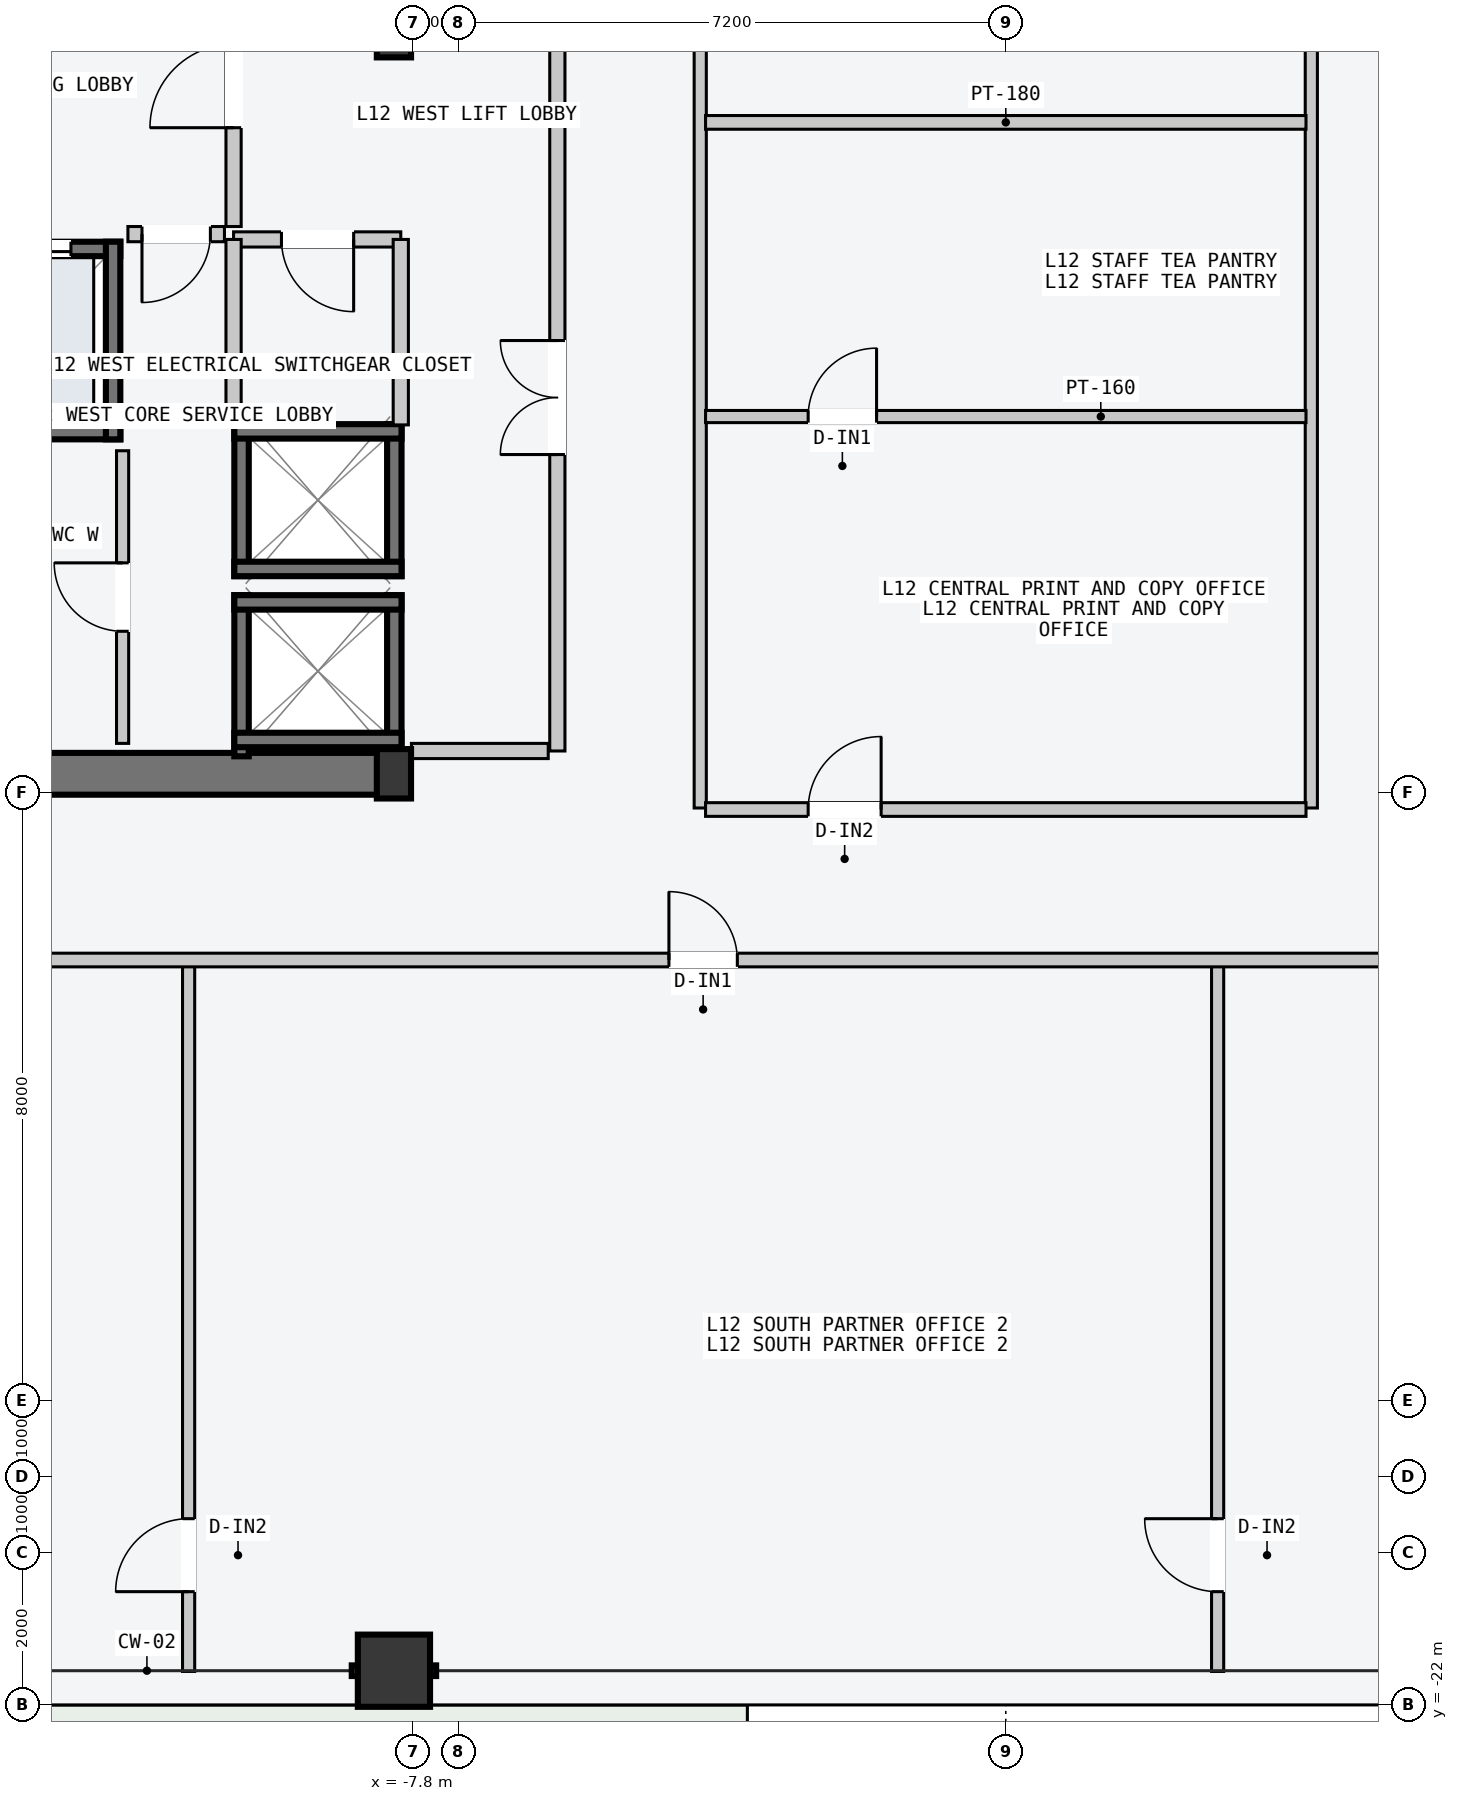
"""IFC4 building model, lengths in metres.
Left out: names, types, materials, properties, quantities, classifications, styles, units other than length and angle.
Written with IfcOpenShell. Run it as: python <this file> out.ifc"""

import sys

from ifc_helpers import new_model, si_unit, direction, frame, frame_2d, origin, origin_2d, place, context, subcontext, project, spatial, rectangle, hollow_rectangle, i_section, extrude, element, fill, save


model = new_model("IFC4")
c1 = context("Model", 3, precision=1e-05, world=origin(), true_north=direction((0.0, 1.0)))
c2 = subcontext(c1, "Body", "Model", "MODEL_VIEW")
j1 = project(units=[si_unit("LENGTHUNIT", "METRE"), si_unit("PLANEANGLEUNIT", "RADIAN")], contexts=[c1])
p1 = place(None, origin())
s1 = spatial("IfcSite", under=j1, at=p1, CompositionType="ELEMENT")
p2 = place(p1, origin())
s2 = spatial("IfcBuilding", under=s1, at=p2, CompositionType="ELEMENT")
p3 = place(p2, frame((0.0, 0.0, 49.2)))
s3 = spatial("IfcBuildingStorey", under=s2, at=p3, CompositionType="ELEMENT", Elevation=49.2)
p4 = place(p3, frame((-14.53, -9.75, -0.2), z_axis=(0.0, 0.0, 1.0), x_axis=(1.0, 0.0, 0.0)))
e1 = element("IfcWall", 1, at=p4, inside=s3, PredefinedType="SHEAR", context=c2, shape_type="SweptSolid", body=[
    extrude(rectangle(XDim=6.46, YDim=0.55, at=frame_2d((3.23, 0.0))), origin(), (0.0, 0.0, 1.0), 3.6),
])
for number, where, z_axis, x_axis in (
    (2, (-8.05, -9.75, 0.0), (0.0, 0.0, 1.0), (1.0, 0.0, 0.0)),
    (3, (-8.05, 0.0, 0.0), (0.0, 0.0, 1.0), (1.0, 0.0, 0.0)),
):
    element("IfcColumn", number, at=place(p3, frame(where, z_axis=z_axis, x_axis=x_axis)), inside=s3, PredefinedType="COLUMN", context=c2, shape_type="SweptSolid", body=[
        extrude(i_section(OverallWidth=0.45, OverallDepth=0.65, WebThickness=0.025, FlangeThickness=0.04, at=origin_2d()), origin(), (0.0, 0.0, 1.0), 3.6),
    ])
p5 = place(p3, frame((-8.05, -21.55, 0.0), z_axis=(0.0, 0.0, 1.0), x_axis=(1.0, 0.0, 0.0)))
e4 = element("IfcColumn", 4, at=p5, inside=s3, PredefinedType="COLUMN", context=c2, shape_type="SweptSolid", body=[
    extrude(hollow_rectangle(XDim=0.95, YDim=0.95, WallThickness=0.048, at=origin_2d()), origin(), (0.0, 0.0, 1.0), 3.6),
])
for number, where, z_axis, x_axis in (
    (5, (-8.045, -9.52, -0.2), (0.0, 0.0, 1.0), (0.0, 1.0, 0.0)),
    (6, (-10.055, -9.52, -0.2), (0.0, 0.0, 1.0), (0.0, 1.0, 0.0)),
):
    element("IfcWall", number, at=place(p3, frame(where, z_axis=z_axis, x_axis=x_axis)), inside=s3, PredefinedType="SOLIDWALL", context=c2, shape_type="SweptSolid", body=[
        extrude(rectangle(XDim=2.12, YDim=0.19, at=frame_2d((1.06, 0.0))), origin(), (0.0, 0.0, 1.0), 3.6),
    ])
for number, where, z_axis, x_axis in (
    (7, (-10.15, -7.495, -0.2), (0.0, 0.0, 1.0), (1.0, 0.0, 0.0)),
    (8, (-10.15, -9.305, -0.2), (0.0, 0.0, 1.0), (1.0, 0.0, 0.0)),
):
    element("IfcWall", number, at=place(p3, frame(where, z_axis=z_axis, x_axis=x_axis)), inside=s3, PredefinedType="SOLIDWALL", context=c2, shape_type="SweptSolid", body=[
        extrude(rectangle(XDim=2.2, YDim=0.19, at=frame_2d((1.1, 0.0))), origin(), (0.0, 0.0, 1.0), 3.6),
    ])
for number, where, z_axis, x_axis in (
    (9, (-8.045, -7.15, -0.2), (0.0, 0.0, 1.0), (0.0, 1.0, 0.0)),
    (10, (-10.055, -7.15, -0.2), (0.0, 0.0, 1.0), (0.0, 1.0, 0.0)),
):
    element("IfcWall", number, at=place(p3, frame(where, z_axis=z_axis, x_axis=x_axis)), inside=s3, PredefinedType="SOLIDWALL", context=c2, shape_type="SweptSolid", body=[
        extrude(rectangle(XDim=2.0, YDim=0.19, at=frame_2d((1.0, 0.0))), origin(), (0.0, 0.0, 1.0), 3.6),
    ])
for number, where, z_axis, x_axis in (
    (11, (-10.15, -5.245, -0.2), (0.0, 0.0, 1.0), (1.0, 0.0, 0.0)),
    (12, (-10.15, -7.055, -0.2), (0.0, 0.0, 1.0), (1.0, 0.0, 0.0)),
):
    element("IfcWall", number, at=place(p3, frame(where, z_axis=z_axis, x_axis=x_axis)), inside=s3, PredefinedType="SOLIDWALL", context=c2, shape_type="SweptSolid", body=[
        extrude(rectangle(XDim=2.2, YDim=0.19, at=frame_2d((1.1, 0.0))), origin(), (0.0, 0.0, 1.0), 3.6),
    ])
p6 = place(p3, frame((-14.33, -2.845, -0.2), z_axis=(0.0, 0.0, 1.0), x_axis=(1.0, 0.0, 0.0)))
e13 = element("IfcWall", 13, at=p6, inside=s3, PredefinedType="SOLIDWALL", context=c2, shape_type="SweptSolid", body=[
    extrude(rectangle(XDim=2.68, YDim=0.19, at=frame_2d((1.34, 0.0))), origin(), (0.0, 0.0, 1.0), 3.6),
])
p7 = place(p6, frame((0.83, 0.0, 0.2)))
e14 = element("IfcOpeningElement", 14, at=p7, cuts=e13, PredefinedType="OPENING", context=c2, shape_type="SweptSolid", body=[
    extrude(rectangle(XDim=1.2, YDim=2.2, at=frame_2d((0.6, 1.1))), frame((0.0, 0.105, 0.0), z_axis=(0.0, -1.0, 0.0), x_axis=(1.0, 0.0, 0.0)), (0.0, 0.0, 1.0), 0.21),
])
p8 = place(p3, frame((-14.33, -5.255, -0.2), z_axis=(0.0, 0.0, 1.0), x_axis=(1.0, 0.0, 0.0)))
e15 = element("IfcWall", 15, at=p8, inside=s3, PredefinedType="SOLIDWALL", context=c2, shape_type="SweptSolid", body=[
    extrude(rectangle(XDim=2.68, YDim=0.19, at=frame_2d((1.34, 0.0))), origin(), (0.0, 0.0, 1.0), 3.6),
])
p9 = place(p3, frame((-11.745, -5.35, -0.2), z_axis=(0.0, 0.0, 1.0), x_axis=(0.0, 1.0, 0.0)))
e16 = element("IfcWall", 16, at=p9, inside=s3, PredefinedType="SOLIDWALL", context=c2, shape_type="SweptSolid", body=[
    extrude(rectangle(XDim=2.6, YDim=0.19, at=frame_2d((1.3, 0.0))), origin(), (0.0, 0.0, 1.0), 3.6),
])
p10 = place(p3, frame((-5.9, -9.45, 0.0), z_axis=(0.0, 0.0, 1.0), x_axis=(0.0, 1.0, 0.0)))
e17 = element("IfcWall", 17, at=p10, inside=s3, PredefinedType="PARTITIONING", context=c2, shape_type="SweptSolid", body=[
    extrude(rectangle(XDim=18.9, YDim=0.2, at=frame_2d((9.45, 0.0))), origin(), (0.0, 0.0, 1.0), 3.4),
])
p11 = place(p10, frame((3.9, 0.0, 0.0)))
e18 = element("IfcOpeningElement", 18, at=p11, cuts=e17, PredefinedType="OPENING", context=c2, shape_type="SweptSolid", body=[
    extrude(rectangle(XDim=1.5, YDim=2.2, at=frame_2d((0.75, 1.1))), frame((0.0, 0.11, 0.0), z_axis=(0.0, -1.0, 0.0), x_axis=(1.0, 0.0, 0.0)), (0.0, 0.0, 1.0), 0.22),
])
p12 = place(p3, frame((-6.02, -9.45, 0.0), z_axis=(0.0, 0.0, 1.0), x_axis=(-1.0, 0.0, 0.0)))
e19 = element("IfcWall", 19, at=p12, inside=s3, PredefinedType="PARTITIONING", context=c2, shape_type="SweptSolid", body=[
    extrude(rectangle(XDim=1.8, YDim=0.2, at=frame_2d((0.9, 0.0))), origin(), (0.0, 0.0, 1.0), 3.4),
])
p13 = place(p3, frame((-10.16, -2.55, 0.0), z_axis=(0.0, 0.0, 1.0), x_axis=(0.0, 1.0, 0.0)))
e20 = element("IfcWall", 20, at=p13, inside=s3, PredefinedType="PARTITIONING", context=c2, shape_type="SweptSolid", body=[
    extrude(rectangle(XDim=3.4, YDim=0.2, at=frame_2d((1.7, 0.0))), origin(), (0.0, 0.0, 1.0), 3.4),
])
p14 = place(p13, frame((1.3, 0.0, 0.0)))
e21 = element("IfcOpeningElement", 21, at=p14, cuts=e20, PredefinedType="OPENING", context=c2, shape_type="SweptSolid", body=[
    extrude(rectangle(XDim=1.1, YDim=2.15, at=frame_2d((0.55, 1.075))), frame((0.0, 0.11, 0.0), z_axis=(0.0, -1.0, 0.0), x_axis=(1.0, 0.0, 0.0)), (0.0, 0.0, 1.0), 0.22),
])
p15 = place(p3, frame((-10.28, -2.65, 0.0), z_axis=(0.0, 0.0, 1.0), x_axis=(-1.0, 0.0, 0.0)))
e22 = element("IfcWall", 22, at=p15, inside=s3, PredefinedType="PARTITIONING", context=c2, shape_type="SweptSolid", body=[
    extrude(rectangle(XDim=1.27, YDim=0.2, at=frame_2d((0.635, 0.0))), origin(), (0.0, 0.0, 1.0), 3.4),
])
p16 = place(p15, frame((0.185, 0.0, 0.0)))
e23 = element("IfcOpeningElement", 23, at=p16, cuts=e22, PredefinedType="OPENING", context=c2, shape_type="SweptSolid", body=[
    extrude(rectangle(XDim=0.9, YDim=2.15, at=frame_2d((0.45, 1.075))), frame((0.0, 0.11, 0.0), z_axis=(0.0, -1.0, 0.0), x_axis=(1.0, 0.0, 0.0)), (0.0, 0.0, 1.0), 0.22),
])
p17 = place(p3, frame((-7.96, -2.72, 0.0), z_axis=(0.0, 0.0, 1.0), x_axis=(-1.0, 0.0, 0.0)))
e24 = element("IfcWall", 24, at=p17, inside=s3, PredefinedType="PARTITIONING", context=c2, shape_type="SweptSolid", body=[
    extrude(rectangle(XDim=2.2, YDim=0.2, at=frame_2d((1.1, 0.0))), origin(), (0.0, 0.0, 1.0), 3.4),
])
p18 = place(p17, frame((0.62, 0.0, 0.0)))
e25 = element("IfcOpeningElement", 25, at=p18, cuts=e24, PredefinedType="OPENING", context=c2, shape_type="SweptSolid", body=[
    extrude(rectangle(XDim=0.95, YDim=2.1, at=frame_2d((0.475, 1.05))), frame((0.0, 0.11, 0.0), z_axis=(0.0, -1.0, 0.0), x_axis=(1.0, 0.0, 0.0)), (0.0, 0.0, 1.0), 0.22),
])
for number, where, z_axis, x_axis in (
    (26, (-7.96, -5.16, 0.0), (0.0, 0.0, 1.0), (0.0, 1.0, 0.0)),
    (27, (-10.16, -5.16, 0.0), (0.0, 0.0, 1.0), (0.0, 1.0, 0.0)),
):
    element("IfcWall", number, at=place(p3, frame(where, z_axis=z_axis, x_axis=x_axis)), inside=s3, PredefinedType="PARTITIONING", context=c2, shape_type="SweptSolid", body=[
        extrude(rectangle(XDim=2.44, YDim=0.2, at=frame_2d((1.22, 0.0))), origin(), (0.0, 0.0, 1.0), 3.4),
    ])
p19 = place(p3, frame((-11.62, -9.35, 0.0), z_axis=(0.0, 0.0, 1.0), x_axis=(0.0, 1.0, 0.0)))
e28 = element("IfcWall", 28, at=p19, inside=s3, PredefinedType="PARTITIONING", context=c2, shape_type="SweptSolid", body=[
    extrude(rectangle(XDim=3.85, YDim=0.16, at=frame_2d((1.925, 0.0))), origin(), (0.0, 0.0, 1.0), 3.4),
])
p20 = place(p19, frame((1.475, 0.0, 0.0)))
e29 = element("IfcOpeningElement", 29, at=p20, cuts=e28, PredefinedType="OPENING", context=c2, shape_type="SweptSolid", body=[
    extrude(rectangle(XDim=0.9, YDim=2.15, at=frame_2d((0.45, 1.075))), frame((0.0, 0.09, 0.0), z_axis=(0.0, -1.0, 0.0), x_axis=(1.0, 0.0, 0.0)), (0.0, 0.0, 1.0), 0.18),
])
for number, where, z_axis, x_axis in (
    (30, (-4.02, -10.2, 0.0), (0.0, 0.0, 1.0), (0.0, 1.0, 0.0)),
    (31, (4.02, -10.2, 0.0), (0.0, 0.0, 1.0), (0.0, 1.0, 0.0)),
):
    element("IfcWall", number, at=place(p3, frame(where, z_axis=z_axis, x_axis=x_axis)), inside=s3, PredefinedType="PARTITIONING", context=c2, shape_type="SweptSolid", body=[
        extrude(rectangle(XDim=22.7, YDim=0.16, at=frame_2d((11.35, 0.0))), origin(), (0.0, 0.0, 1.0), 3.4),
    ])
p21 = place(p3, frame((-3.95, -1.18, 0.0), z_axis=(0.0, 0.0, 1.0), x_axis=(1.0, 0.0, 0.0)))
e32 = element("IfcWall", 32, at=p21, inside=s3, PredefinedType="PARTITIONING", context=c2, shape_type="SweptSolid", body=[
    extrude(rectangle(XDim=7.9, YDim=0.18, at=frame_2d((3.95, 0.0))), origin(), (0.0, 0.0, 1.0), 3.4),
])
p22 = place(p3, frame((-3.95, -10.22, 0.0), z_axis=(0.0, 0.0, 1.0), x_axis=(1.0, 0.0, 0.0)))
e33 = element("IfcWall", 33, at=p22, inside=s3, PredefinedType="PARTITIONING", context=c2, shape_type="SweptSolid", body=[
    extrude(rectangle(XDim=7.9, YDim=0.18, at=frame_2d((3.95, 0.0))), origin(), (0.0, 0.0, 1.0), 3.4),
])
p23 = place(p22, frame((1.35, 0.0, 0.0)))
e34 = element("IfcOpeningElement", 34, at=p23, cuts=e33, PredefinedType="OPENING", context=c2, shape_type="SweptSolid", body=[
    extrude(rectangle(XDim=0.96, YDim=2.18, at=frame_2d((0.48, 1.09))), frame((0.0, 0.1, 0.0), z_axis=(0.0, -1.0, 0.0), x_axis=(1.0, 0.0, 0.0)), (0.0, 0.0, 1.0), 0.2),
])
p24 = place(p3, frame((-3.95, -5.05, 0.0), z_axis=(0.0, 0.0, 1.0), x_axis=(1.0, 0.0, 0.0)))
e35 = element("IfcWall", 35, at=p24, inside=s3, PredefinedType="PARTITIONING", context=c2, shape_type="SweptSolid", body=[
    extrude(rectangle(XDim=7.9, YDim=0.16, at=frame_2d((3.95, 0.0))), origin(), (0.0, 0.0, 1.0), 3.4),
])
p25 = place(p24, frame((1.35, 0.0, 0.0)))
e36 = element("IfcOpeningElement", 36, at=p25, cuts=e35, PredefinedType="OPENING", context=c2, shape_type="SweptSolid", body=[
    extrude(rectangle(XDim=0.9, YDim=2.15, at=frame_2d((0.45, 1.075))), frame((0.0, 0.09, 0.0), z_axis=(0.0, -1.0, 0.0), x_axis=(1.0, 0.0, 0.0)), (0.0, 0.0, 1.0), 0.18),
])
p26 = place(p3, frame((-10.751, -21.56, 0.0), z_axis=(0.0, 0.0, 1.0), x_axis=(0.0, 1.0, 0.0)))
e37 = element("IfcWall", 37, at=p26, inside=s3, PredefinedType="PARTITIONING", context=c2, shape_type="SweptSolid", body=[
    extrude(rectangle(XDim=9.3, YDim=0.16, at=frame_2d((4.65, 0.0))), origin(), (0.0, 0.0, 1.0), 3.4),
])
p27 = place(p26, frame((1.05, 0.0, 0.0)))
e38 = element("IfcOpeningElement", 38, at=p27, cuts=e37, PredefinedType="OPENING", context=c2, shape_type="SweptSolid", body=[
    extrude(rectangle(XDim=0.96, YDim=2.18, at=frame_2d((0.48, 1.09))), frame((0.0, 0.09, 0.0), z_axis=(0.0, -1.0, 0.0), x_axis=(1.0, 0.0, 0.0)), (0.0, 0.0, 1.0), 0.18),
])
p28 = place(p3, frame((2.787, -21.56, 0.0), z_axis=(0.0, 0.0, 1.0), x_axis=(0.0, 1.0, 0.0)))
e39 = element("IfcWall", 39, at=p28, inside=s3, PredefinedType="PARTITIONING", context=c2, shape_type="SweptSolid", body=[
    extrude(rectangle(XDim=9.3, YDim=0.16, at=frame_2d((4.65, 0.0))), origin(), (0.0, 0.0, 1.0), 3.4),
])
p29 = place(p28, frame((1.05, 0.0, 0.0)))
e40 = element("IfcOpeningElement", 40, at=p29, cuts=e39, PredefinedType="OPENING", context=c2, shape_type="SweptSolid", body=[
    extrude(rectangle(XDim=0.96, YDim=2.18, at=frame_2d((0.48, 1.09))), frame((0.0, 0.09, 0.0), z_axis=(0.0, -1.0, 0.0), x_axis=(1.0, 0.0, 0.0)), (0.0, 0.0, 1.0), 0.18),
])
p30 = place(p3, frame((-19.2, -12.2, 0.0), z_axis=(0.0, 0.0, 1.0), x_axis=(1.0, 0.0, 0.0)))
e41 = element("IfcWall", 41, at=p30, inside=s3, PredefinedType="PARTITIONING", context=c2, shape_type="SweptSolid", body=[
    extrude(rectangle(XDim=38.4, YDim=0.18, at=frame_2d((19.2, 0.0))), origin(), (0.0, 0.0, 1.0), 3.4),
])
p31 = place(p30, frame((3.524, 0.0, 0.0)))
e42 = element("IfcOpeningElement", 42, at=p31, cuts=e41, PredefinedType="OPENING", context=c2, shape_type="SweptSolid", body=[
    extrude(rectangle(XDim=1.4, YDim=2.2, at=frame_2d((0.7, 1.1))), frame((0.0, 0.1, 0.0), z_axis=(0.0, -1.0, 0.0), x_axis=(1.0, 0.0, 0.0)), (0.0, 0.0, 1.0), 0.2),
])
p32 = place(p30, frame((14.768, 0.0, 0.0)))
e43 = element("IfcOpeningElement", 43, at=p32, cuts=e41, PredefinedType="OPENING", context=c2, shape_type="SweptSolid", body=[
    extrude(rectangle(XDim=0.9, YDim=2.15, at=frame_2d((0.45, 1.075))), frame((0.0, 0.1, 0.0), z_axis=(0.0, -1.0, 0.0), x_axis=(1.0, 0.0, 0.0)), (0.0, 0.0, 1.0), 0.2),
])
p33 = place(p30, frame((29.714, 0.0, 0.0)))
e44 = element("IfcOpeningElement", 44, at=p33, cuts=e41, PredefinedType="OPENING", context=c2, shape_type="SweptSolid", body=[
    extrude(rectangle(XDim=0.96, YDim=2.18, at=frame_2d((0.48, 1.09))), frame((0.0, 0.1, 0.0), z_axis=(0.0, -1.0, 0.0), x_axis=(1.0, 0.0, 0.0)), (0.0, 0.0, 1.0), 0.2),
])
p34 = place(p7, origin())
e45 = element("IfcDoor", 45, at=p34, inside=s3, OperationType="SLIDING_TO_LEFT", PredefinedType="DOOR", context=c2, shape_type="SweptSolid", body=[
    extrude(rectangle(XDim=1.2, YDim=2.2, at=frame_2d((0.6, 1.1))), frame((0.0, 0.025, 0.0), z_axis=(0.0, -1.0, 0.0), x_axis=(1.0, 0.0, 0.0)), (0.0, 0.0, 1.0), 0.05),
])
fill(e14, e45)
p35 = place(p11, origin())
e46 = element("IfcDoor", 46, at=p35, inside=s3, OperationType="DOUBLE_DOOR_SINGLE_SWING", PredefinedType="DOOR", context=c2, shape_type="SweptSolid", body=[
    extrude(rectangle(XDim=1.5, YDim=2.2, at=frame_2d((0.75, 1.1))), frame((0.0, 0.025, 0.0), z_axis=(0.0, -1.0, 0.0), x_axis=(1.0, 0.0, 0.0)), (0.0, 0.0, 1.0), 0.05),
])
fill(e18, e46)
p36 = place(p14, origin())
e47 = element("IfcDoor", 47, at=p36, inside=s3, OperationType="SINGLE_SWING_LEFT", PredefinedType="DOOR", context=c2, shape_type="SweptSolid", body=[
    extrude(rectangle(XDim=1.1, YDim=2.15, at=frame_2d((0.55, 1.075))), frame((0.0, 0.025, 0.0), z_axis=(0.0, -1.0, 0.0), x_axis=(1.0, 0.0, 0.0)), (0.0, 0.0, 1.0), 0.05),
])
fill(e21, e47)
p37 = place(p16, origin())
e48 = element("IfcDoor", 48, at=p37, inside=s3, OperationType="SINGLE_SWING_RIGHT", PredefinedType="DOOR", context=c2, shape_type="SweptSolid", body=[
    extrude(rectangle(XDim=0.9, YDim=2.15, at=frame_2d((0.45, 1.075))), frame((0.0, 0.025, 0.0), z_axis=(0.0, -1.0, 0.0), x_axis=(1.0, 0.0, 0.0)), (0.0, 0.0, 1.0), 0.05),
])
fill(e23, e48)
p38 = place(p18, origin())
e49 = element("IfcDoor", 49, at=p38, inside=s3, OperationType="SINGLE_SWING_LEFT", PredefinedType="DOOR", context=c2, shape_type="SweptSolid", body=[
    extrude(rectangle(XDim=0.95, YDim=2.1, at=frame_2d((0.475, 1.05))), frame((0.0, 0.025, 0.0), z_axis=(0.0, -1.0, 0.0), x_axis=(1.0, 0.0, 0.0)), (0.0, 0.0, 1.0), 0.05),
])
fill(e25, e49)
p39 = place(p20, origin())
e50 = element("IfcDoor", 50, at=p39, inside=s3, OperationType="SINGLE_SWING_RIGHT", PredefinedType="DOOR", context=c2, shape_type="SweptSolid", body=[
    extrude(rectangle(XDim=0.9, YDim=2.15, at=frame_2d((0.45, 1.075))), frame((0.0, 0.025, 0.0), z_axis=(0.0, -1.0, 0.0), x_axis=(1.0, 0.0, 0.0)), (0.0, 0.0, 1.0), 0.05),
])
fill(e29, e50)
p40 = place(p23, origin())
e51 = element("IfcDoor", 51, at=p40, inside=s3, OperationType="SINGLE_SWING_RIGHT", PredefinedType="DOOR", context=c2, shape_type="SweptSolid", body=[
    extrude(rectangle(XDim=0.96, YDim=2.18, at=frame_2d((0.48, 1.09))), frame((0.0, 0.025, 0.0), z_axis=(0.0, -1.0, 0.0), x_axis=(1.0, 0.0, 0.0)), (0.0, 0.0, 1.0), 0.05),
])
fill(e34, e51)
p41 = place(p25, origin())
e52 = element("IfcDoor", 52, at=p41, inside=s3, OperationType="SINGLE_SWING_RIGHT", PredefinedType="DOOR", context=c2, shape_type="SweptSolid", body=[
    extrude(rectangle(XDim=0.9, YDim=2.15, at=frame_2d((0.45, 1.075))), frame((0.0, 0.025, 0.0), z_axis=(0.0, -1.0, 0.0), x_axis=(1.0, 0.0, 0.0)), (0.0, 0.0, 1.0), 0.05),
])
fill(e36, e52)
p42 = place(p27, origin())
e53 = element("IfcDoor", 53, at=p42, inside=s3, OperationType="SINGLE_SWING_LEFT", PredefinedType="DOOR", context=c2, shape_type="SweptSolid", body=[
    extrude(rectangle(XDim=0.96, YDim=2.18, at=frame_2d((0.48, 1.09))), frame((0.0, 0.025, 0.0), z_axis=(0.0, -1.0, 0.0), x_axis=(1.0, 0.0, 0.0)), (0.0, 0.0, 1.0), 0.05),
])
fill(e38, e53)
p43 = place(p29, origin())
e54 = element("IfcDoor", 54, at=p43, inside=s3, OperationType="SINGLE_SWING_RIGHT", PredefinedType="DOOR", context=c2, shape_type="SweptSolid", body=[
    extrude(rectangle(XDim=0.96, YDim=2.18, at=frame_2d((0.48, 1.09))), frame((0.0, 0.025, 0.0), z_axis=(0.0, -1.0, 0.0), x_axis=(1.0, 0.0, 0.0)), (0.0, 0.0, 1.0), 0.05),
])
fill(e40, e54)
p44 = place(p32, origin())
e55 = element("IfcDoor", 55, at=p44, inside=s3, OperationType="SINGLE_SWING_LEFT", PredefinedType="DOOR", context=c2, shape_type="SweptSolid", body=[
    extrude(rectangle(XDim=0.9, YDim=2.15, at=frame_2d((0.45, 1.075))), frame((0.0, 0.025, 0.0), z_axis=(0.0, -1.0, 0.0), x_axis=(1.0, 0.0, 0.0)), (0.0, 0.0, 1.0), 0.05),
])
fill(e43, e55)
save(model, sys.argv[1])
